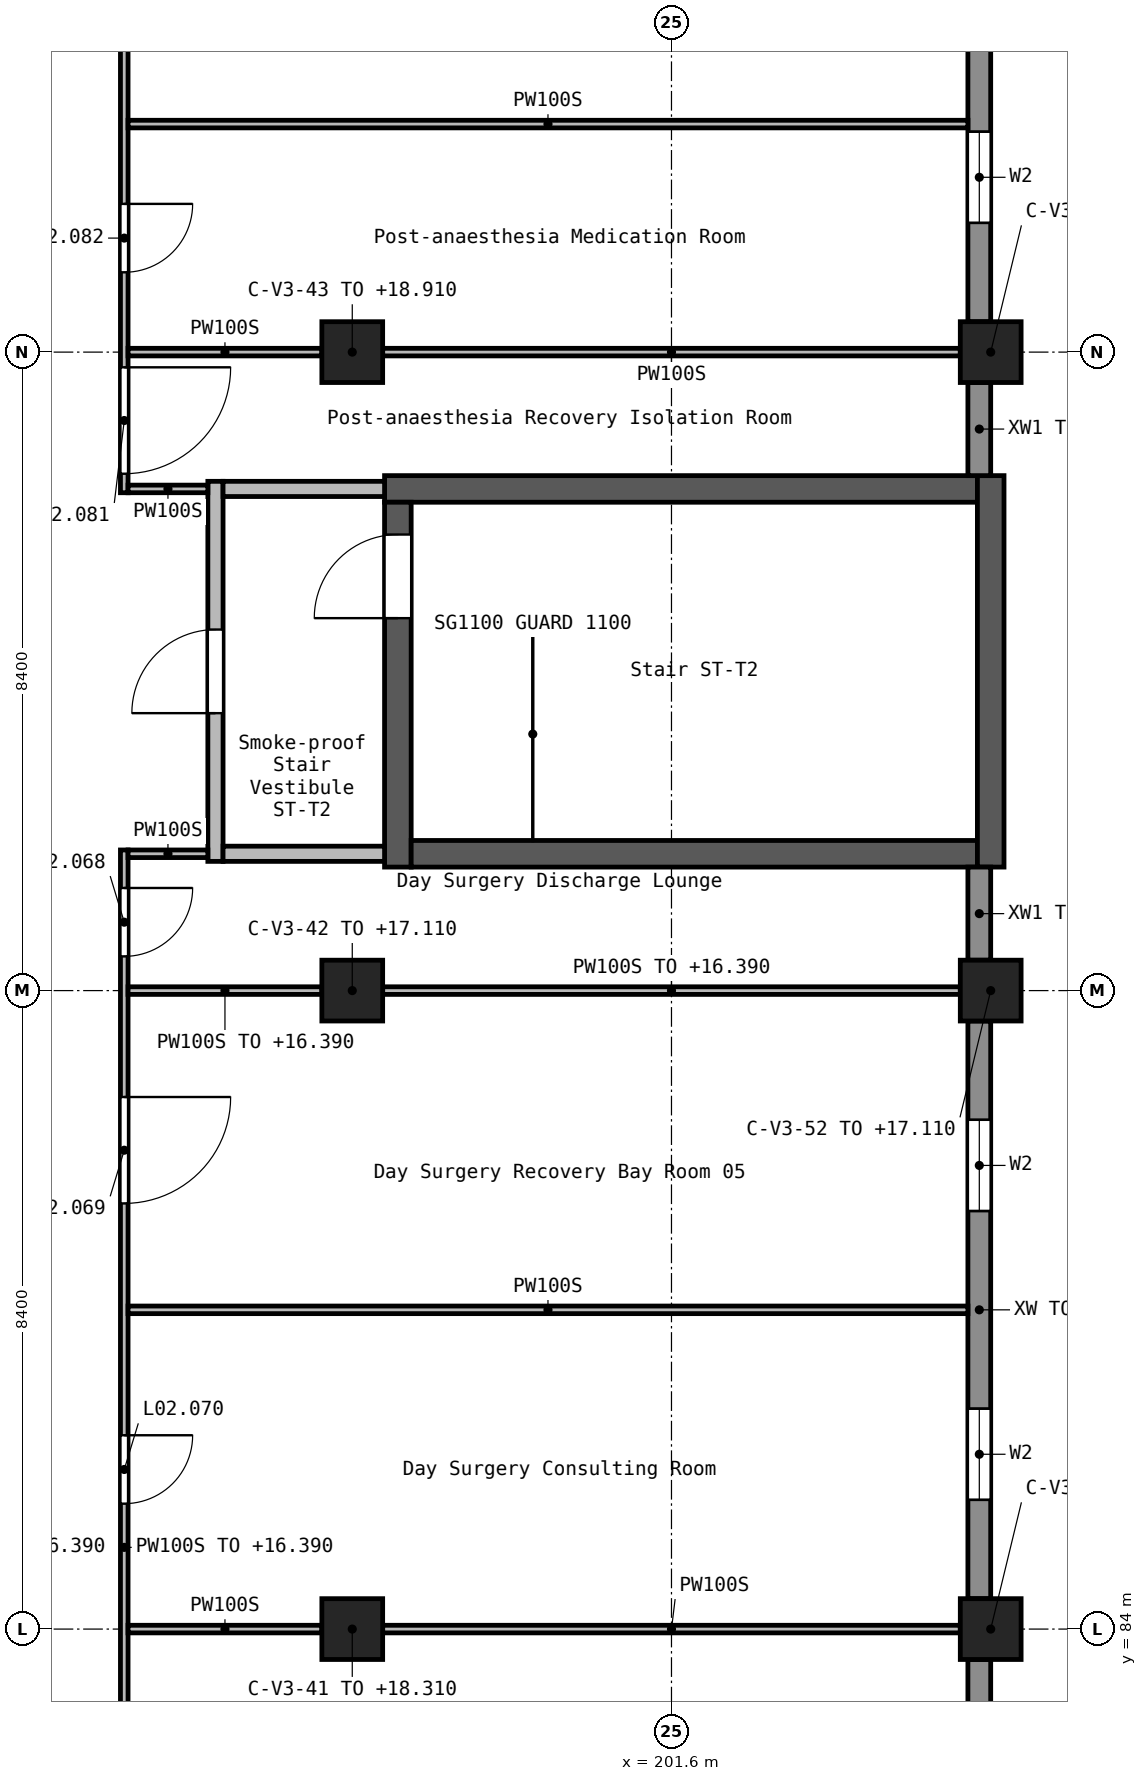
"""IFC4 building model, lengths in metres.
Left out: names, types, materials, properties, quantities, classifications, styles, units other than length and angle.
Written with IfcOpenShell. Run it as: python <this file> out.ifc"""

import sys

from ifc_helpers import new_model, si_unit, direction, frame, frame_2d, origin, origin_2d, place, context, subcontext, project, spatial, rectangle, extrude, element, fill, save


model = new_model("IFC4")
c1 = context("Model", 3, precision=1e-05, world=origin(), true_north=direction((0.0, 1.0)))
c2 = subcontext(c1, "Body", "Model", "MODEL_VIEW")
j1 = project(units=[si_unit("LENGTHUNIT", "METRE"), si_unit("PLANEANGLEUNIT", "RADIAN")], contexts=[c1])
p1 = place(None, origin())
s1 = spatial("IfcSite", under=j1, at=p1, CompositionType="ELEMENT")
p2 = place(p1, origin())
s2 = spatial("IfcBuilding", under=s1, at=p2, CompositionType="ELEMENT")
p3 = place(p2, frame((0.0, 0.0, 12.6)))
s3 = spatial("IfcBuildingStorey", under=s2, at=p3, CompositionType="ELEMENT", Elevation=12.6)
p4 = place(p3, frame((197.4, 84.0, 0.0), z_axis=(0.0, 0.0, 1.0), x_axis=(1.0, 0.0, 0.0)))
e1 = element("IfcColumn", 1, at=p4, inside=s3, PredefinedType="COLUMN", context=c2, shape_type="SweptSolid", body=[
    extrude(rectangle(XDim=0.8, YDim=0.8, at=origin_2d()), origin(), (0.0, 0.0, 1.0), 5.71),
])
p5 = place(p3, frame((197.4, 92.4, 0.0), z_axis=(0.0, 0.0, 1.0), x_axis=(1.0, 0.0, 0.0)))
e2 = element("IfcColumn", 2, at=p5, inside=s3, PredefinedType="COLUMN", context=c2, shape_type="SweptSolid", body=[
    extrude(rectangle(XDim=0.8, YDim=0.8, at=origin_2d()), origin(), (0.0, 0.0, 1.0), 4.51),
])
p6 = place(p3, frame((197.4, 100.8, 0.0), z_axis=(0.0, 0.0, 1.0), x_axis=(1.0, 0.0, 0.0)))
e3 = element("IfcColumn", 3, at=p6, inside=s3, PredefinedType="COLUMN", context=c2, shape_type="SweptSolid", body=[
    extrude(rectangle(XDim=0.8, YDim=0.8, at=origin_2d()), origin(), (0.0, 0.0, 1.0), 6.31),
])
p7 = place(p3, frame((205.8, 84.0, 0.0), z_axis=(0.0, 0.0, 1.0), x_axis=(1.0, 0.0, 0.0)))
e4 = element("IfcColumn", 4, at=p7, inside=s3, PredefinedType="COLUMN", context=c2, shape_type="SweptSolid", body=[
    extrude(rectangle(XDim=0.8, YDim=0.8, at=origin_2d()), origin(), (0.0, 0.0, 1.0), 5.71),
])
p8 = place(p3, frame((205.8, 92.4, 0.0), z_axis=(0.0, 0.0, 1.0), x_axis=(1.0, 0.0, 0.0)))
e5 = element("IfcColumn", 5, at=p8, inside=s3, PredefinedType="COLUMN", context=c2, shape_type="SweptSolid", body=[
    extrude(rectangle(XDim=0.8, YDim=0.8, at=origin_2d()), origin(), (0.0, 0.0, 1.0), 4.51),
])
p9 = place(p3, frame((205.8, 100.8, 0.0), z_axis=(0.0, 0.0, 1.0), x_axis=(1.0, 0.0, 0.0)))
e6 = element("IfcColumn", 6, at=p9, inside=s3, PredefinedType="COLUMN", context=c2, shape_type="SweptSolid", body=[
    extrude(rectangle(XDim=0.8, YDim=0.8, at=origin_2d()), origin(), (0.0, 0.0, 1.0), 6.31),
])
p10 = place(p3, frame((197.825, 99.0, 0.0), z_axis=(0.0, 0.0, 1.0), x_axis=(1.0, 0.0, 0.0)))
e7 = element("IfcWall", 7, at=p10, inside=s3, PredefinedType="SHEAR", context=c2, shape_type="SweptSolid", body=[
    extrude(rectangle(XDim=7.8, YDim=0.35, at=frame_2d((3.9, 0.0))), origin(), (0.0, 0.0, 1.0), 4.2),
])
p11 = place(p3, frame((198.0, 94.025, 0.0), z_axis=(0.0, 0.0, 1.0), x_axis=(0.0, 1.0, 0.0)))
e8 = element("IfcWall", 8, at=p11, inside=s3, PredefinedType="SHEAR", context=c2, shape_type="SweptSolid", body=[
    extrude(rectangle(XDim=4.8, YDim=0.35, at=frame_2d((2.4, 0.0))), origin(), (0.0, 0.0, 1.0), 4.2),
])
p12 = place(p11, frame((3.275, 0.0, 0.0)))
e9 = element("IfcOpeningElement", 9, at=p12, cuts=e8, PredefinedType="OPENING", context=c2, shape_type="SweptSolid", body=[
    extrude(rectangle(XDim=1.1, YDim=2.1, at=frame_2d((0.55, 1.05))), frame((0.0, 0.185, 0.0), z_axis=(0.0, -1.0, 0.0), x_axis=(1.0, 0.0, 0.0)), (0.0, 0.0, 1.0), 0.37),
])
p13 = place(p3, frame((198.175, 94.2, 0.0), z_axis=(0.0, 0.0, 1.0), x_axis=(1.0, 0.0, 0.0)))
e10 = element("IfcWall", 10, at=p13, inside=s3, PredefinedType="SHEAR", context=c2, shape_type="SweptSolid", body=[
    extrude(rectangle(XDim=7.45, YDim=0.35, at=frame_2d((3.725, 0.0))), origin(), (0.0, 0.0, 1.0), 4.2),
])
p14 = place(p3, frame((205.8, 94.025, 0.0), z_axis=(0.0, 0.0, 1.0), x_axis=(0.0, 1.0, 0.0)))
e11 = element("IfcWall", 11, at=p14, inside=s3, PredefinedType="SHEAR", context=c2, shape_type="SweptSolid", body=[
    extrude(rectangle(XDim=5.15, YDim=0.35, at=frame_2d((2.575, 0.0))), origin(), (0.0, 0.0, 1.0), 4.2),
])
p15 = place(p3, frame((205.65, 76.0, 0.0), z_axis=(0.0, 0.0, 1.0), x_axis=(0.0, 1.0, 0.0)))
e12 = element("IfcWall", 12, at=p15, inside=s3, PredefinedType="STANDARD", context=c2, shape_type="SweptSolid", body=[
    extrude(rectangle(XDim=7.6, YDim=0.3, at=frame_2d((3.8, 0.0))), origin(), (0.0, 0.0, 1.0), 3.05),
])
p16 = place(p15, frame((1.3, 0.0, 1.2)))
e13 = element("IfcOpeningElement", 13, at=p16, cuts=e12, PredefinedType="OPENING", context=c2, shape_type="SweptSolid", body=[
    extrude(rectangle(XDim=1.2, YDim=1.2, at=frame_2d((0.6, 0.6))), frame((0.0, 0.16, 0.0), z_axis=(0.0, -1.0, 0.0), x_axis=(1.0, 0.0, 0.0)), (0.0, 0.0, 1.0), 0.32),
])
p17 = place(p15, frame((5.1, 0.0, 1.2)))
e14 = element("IfcOpeningElement", 14, at=p17, cuts=e12, PredefinedType="OPENING", context=c2, shape_type="SweptSolid", body=[
    extrude(rectangle(XDim=1.2, YDim=1.2, at=frame_2d((0.6, 0.6))), frame((0.0, 0.16, 0.0), z_axis=(0.0, -1.0, 0.0), x_axis=(1.0, 0.0, 0.0)), (0.0, 0.0, 1.0), 0.32),
])
p18 = place(p3, frame((205.65, 84.4, 0.0), z_axis=(0.0, 0.0, 1.0), x_axis=(0.0, 1.0, 0.0)))
e15 = element("IfcWall", 15, at=p18, inside=s3, PredefinedType="STANDARD", context=c2, shape_type="SweptSolid", body=[
    extrude(rectangle(XDim=7.6, YDim=0.3, at=frame_2d((3.8, 0.0))), origin(), (0.0, 0.0, 1.0), 3.05),
])
p19 = place(p18, frame((1.3, 0.0, 1.2)))
e16 = element("IfcOpeningElement", 16, at=p19, cuts=e15, PredefinedType="OPENING", context=c2, shape_type="SweptSolid", body=[
    extrude(rectangle(XDim=1.2, YDim=1.2, at=frame_2d((0.6, 0.6))), frame((0.0, 0.16, 0.0), z_axis=(0.0, -1.0, 0.0), x_axis=(1.0, 0.0, 0.0)), (0.0, 0.0, 1.0), 0.32),
])
p20 = place(p18, frame((5.1, 0.0, 1.2)))
e17 = element("IfcOpeningElement", 17, at=p20, cuts=e15, PredefinedType="OPENING", context=c2, shape_type="SweptSolid", body=[
    extrude(rectangle(XDim=1.2, YDim=1.2, at=frame_2d((0.6, 0.6))), frame((0.0, 0.16, 0.0), z_axis=(0.0, -1.0, 0.0), x_axis=(1.0, 0.0, 0.0)), (0.0, 0.0, 1.0), 0.32),
])
for number, where, z_axis, x_axis in (
    (18, (205.65, 92.8, 0.0), (0.0, 0.0, 1.0), (0.0, 1.0, 0.0)),
    (19, (205.65, 99.175, 0.0), (0.0, 0.0, 1.0), (0.0, 1.0, 0.0)),
):
    element("IfcWall", number, at=place(p3, frame(where, z_axis=z_axis, x_axis=x_axis)), inside=s3, PredefinedType="STANDARD", context=c2, shape_type="SweptSolid", body=[
        extrude(rectangle(XDim=1.225, YDim=0.3, at=frame_2d((0.612, 0.0))), origin(), (0.0, 0.0, 1.0), 3.05),
    ])
p21 = place(p3, frame((205.65, 101.2, 0.0), z_axis=(0.0, 0.0, 1.0), x_axis=(0.0, 1.0, 0.0)))
e20 = element("IfcWall", 20, at=p21, inside=s3, PredefinedType="STANDARD", context=c2, shape_type="SweptSolid", body=[
    extrude(rectangle(XDim=7.6, YDim=0.3, at=frame_2d((3.8, 0.0))), origin(), (0.0, 0.0, 1.0), 3.05),
])
p22 = place(p21, frame((1.3, 0.0, 1.2)))
e21 = element("IfcOpeningElement", 21, at=p22, cuts=e20, PredefinedType="OPENING", context=c2, shape_type="SweptSolid", body=[
    extrude(rectangle(XDim=1.2, YDim=1.2, at=frame_2d((0.6, 0.6))), frame((0.0, 0.16, 0.0), z_axis=(0.0, -1.0, 0.0), x_axis=(1.0, 0.0, 0.0)), (0.0, 0.0, 1.0), 0.32),
])
p23 = place(p21, frame((5.1, 0.0, 1.2)))
e22 = element("IfcOpeningElement", 22, at=p23, cuts=e20, PredefinedType="OPENING", context=c2, shape_type="SweptSolid", body=[
    extrude(rectangle(XDim=1.2, YDim=1.2, at=frame_2d((0.6, 0.6))), frame((0.0, 0.16, 0.0), z_axis=(0.0, -1.0, 0.0), x_axis=(1.0, 0.0, 0.0)), (0.0, 0.0, 1.0), 0.32),
])
p24 = place(p3, frame((195.6, 94.1, 0.0), z_axis=(0.0, 0.0, 1.0), x_axis=(0.0, 1.0, 0.0)))
e23 = element("IfcWall", 23, at=p24, inside=s3, PredefinedType="SOLIDWALL", context=c2, shape_type="SweptSolid", body=[
    extrude(rectangle(XDim=5.0, YDim=0.2, at=frame_2d((2.5, 0.0))), origin(), (0.0, 0.0, 1.0), 3.85),
])
p25 = place(p24, frame((1.95, 0.0, 0.0)))
e24 = element("IfcOpeningElement", 24, at=p25, cuts=e23, PredefinedType="OPENING", context=c2, shape_type="SweptSolid", body=[
    extrude(rectangle(XDim=1.1, YDim=2.1, at=frame_2d((0.55, 1.05))), frame((0.0, 0.11, 0.0), z_axis=(0.0, -1.0, 0.0), x_axis=(1.0, 0.0, 0.0)), (0.0, 0.0, 1.0), 0.22),
])
for number, where, z_axis, x_axis in (
    (25, (195.7, 94.2, 0.0), (0.0, 0.0, 1.0), (1.0, 0.0, 0.0)),
    (26, (195.7, 99.0, 0.0), (0.0, 0.0, 1.0), (1.0, 0.0, 0.0)),
):
    element("IfcWall", number, at=place(p3, frame(where, z_axis=z_axis, x_axis=x_axis)), inside=s3, PredefinedType="SOLIDWALL", context=c2, shape_type="SweptSolid", body=[
        extrude(rectangle(XDim=2.125, YDim=0.2, at=frame_2d((1.062, 0.0))), origin(), (0.0, 0.0, 1.0), 3.85),
    ])
p26 = place(p3, frame((194.4, 94.25, 0.0), z_axis=(0.0, 0.0, 1.0), x_axis=(0.0, -1.0, 0.0)))
e27 = element("IfcWall", 27, at=p26, inside=s3, PredefinedType="PARTITIONING", context=c2, shape_type="SweptSolid", body=[
    extrude(rectangle(XDim=18.35, YDim=0.1, at=frame_2d((9.175, 0.0))), origin(), (0.0, 0.0, 1.0), 3.79),
])
p27 = place(p26, frame((0.5, 0.0, 0.0)))
e28 = element("IfcOpeningElement", 28, at=p27, cuts=e27, PredefinedType="OPENING", context=c2, shape_type="SweptSolid", body=[
    extrude(rectangle(XDim=0.9, YDim=2.1, at=frame_2d((0.45, 1.05))), frame((0.0, 0.06, 0.0), z_axis=(0.0, -1.0, 0.0), x_axis=(1.0, 0.0, 0.0)), (0.0, 0.0, 1.0), 0.12),
])
p28 = place(p26, frame((3.25, 0.0, 0.0)))
e29 = element("IfcOpeningElement", 29, at=p28, cuts=e27, PredefinedType="OPENING", context=c2, shape_type="SweptSolid", body=[
    extrude(rectangle(XDim=1.4, YDim=2.1, at=frame_2d((0.7, 1.05))), frame((0.0, 0.06, 0.0), z_axis=(0.0, -1.0, 0.0), x_axis=(1.0, 0.0, 0.0)), (0.0, 0.0, 1.0), 0.12),
])
p29 = place(p26, frame((7.7, 0.0, 0.0)))
e30 = element("IfcOpeningElement", 30, at=p29, cuts=e27, PredefinedType="OPENING", context=c2, shape_type="SweptSolid", body=[
    extrude(rectangle(XDim=0.9, YDim=2.1, at=frame_2d((0.45, 1.05))), frame((0.0, 0.06, 0.0), z_axis=(0.0, -1.0, 0.0), x_axis=(1.0, 0.0, 0.0)), (0.0, 0.0, 1.0), 0.12),
])
p30 = place(p26, frame((11.55, 0.0, 0.0)))
e31 = element("IfcOpeningElement", 31, at=p30, cuts=e27, PredefinedType="OPENING", context=c2, shape_type="SweptSolid", body=[
    extrude(rectangle(XDim=1.0, YDim=2.1, at=frame_2d((0.5, 1.05))), frame((0.0, 0.06, 0.0), z_axis=(0.0, -1.0, 0.0), x_axis=(1.0, 0.0, 0.0)), (0.0, 0.0, 1.0), 0.12),
])
p31 = place(p26, frame((15.55, 0.0, 0.0)))
e32 = element("IfcOpeningElement", 32, at=p31, cuts=e27, PredefinedType="OPENING", context=c2, shape_type="SweptSolid", body=[
    extrude(rectangle(XDim=1.4, YDim=2.1, at=frame_2d((0.7, 1.05))), frame((0.0, 0.06, 0.0), z_axis=(0.0, -1.0, 0.0), x_axis=(1.0, 0.0, 0.0)), (0.0, 0.0, 1.0), 0.12),
])
p32 = place(p3, frame((194.4, 117.3, 0.0), z_axis=(0.0, 0.0, 1.0), x_axis=(0.0, -1.0, 0.0)))
e33 = element("IfcWall", 33, at=p32, inside=s3, PredefinedType="PARTITIONING", context=c2, shape_type="SweptSolid", body=[
    extrude(rectangle(XDim=18.35, YDim=0.1, at=frame_2d((9.175, 0.0))), origin(), (0.0, 0.0, 1.0), 3.85),
])
p33 = place(p32, frame((16.7, 0.0, 0.0)))
e34 = element("IfcOpeningElement", 34, at=p33, cuts=e33, PredefinedType="OPENING", context=c2, shape_type="SweptSolid", body=[
    extrude(rectangle(XDim=1.4, YDim=2.1, at=frame_2d((0.7, 1.05))), frame((0.0, 0.06, 0.0), z_axis=(0.0, -1.0, 0.0), x_axis=(1.0, 0.0, 0.0)), (0.0, 0.0, 1.0), 0.12),
])
p34 = place(p32, frame((14.55, 0.0, 0.0)))
e35 = element("IfcOpeningElement", 35, at=p34, cuts=e33, PredefinedType="OPENING", context=c2, shape_type="SweptSolid", body=[
    extrude(rectangle(XDim=0.9, YDim=2.1, at=frame_2d((0.45, 1.05))), frame((0.0, 0.06, 0.0), z_axis=(0.0, -1.0, 0.0), x_axis=(1.0, 0.0, 0.0)), (0.0, 0.0, 1.0), 0.12),
])
p35 = place(p32, frame((10.1, 0.0, 0.0)))
e36 = element("IfcOpeningElement", 36, at=p35, cuts=e33, PredefinedType="OPENING", context=c2, shape_type="SweptSolid", body=[
    extrude(rectangle(XDim=1.4, YDim=2.1, at=frame_2d((0.7, 1.05))), frame((0.0, 0.06, 0.0), z_axis=(0.0, -1.0, 0.0), x_axis=(1.0, 0.0, 0.0)), (0.0, 0.0, 1.0), 0.12),
])
p36 = place(p32, frame((3.45, 0.0, 0.0)))
e37 = element("IfcOpeningElement", 37, at=p36, cuts=e33, PredefinedType="OPENING", context=c2, shape_type="SweptSolid", body=[
    extrude(rectangle(XDim=0.9, YDim=2.1, at=frame_2d((0.45, 1.05))), frame((0.0, 0.06, 0.0), z_axis=(0.0, -1.0, 0.0), x_axis=(1.0, 0.0, 0.0)), (0.0, 0.0, 1.0), 0.12),
])
p37 = place(p3, frame((194.45, 84.0, 0.0), z_axis=(0.0, 0.0, 1.0), x_axis=(1.0, 0.0, 0.0)))
e38 = element("IfcWall", 38, at=p37, inside=s3, PredefinedType="PARTITIONING", context=c2, shape_type="SweptSolid", body=[
    extrude(rectangle(XDim=2.55, YDim=0.1, at=frame_2d((1.275, 0.0))), origin(), (0.0, 0.0, 1.0), 3.85),
])
p38 = place(p3, frame((197.8, 84.0, 0.0), z_axis=(0.0, 0.0, 1.0), x_axis=(1.0, 0.0, 0.0)))
e39 = element("IfcWall", 39, at=p38, inside=s3, PredefinedType="PARTITIONING", context=c2, shape_type="SweptSolid", body=[
    extrude(rectangle(XDim=7.6, YDim=0.1, at=frame_2d((3.8, 0.0))), origin(), (0.0, 0.0, 1.0), 3.85),
])
p39 = place(p3, frame((194.45, 88.2, 0.0), z_axis=(0.0, 0.0, 1.0), x_axis=(1.0, 0.0, 0.0)))
e40 = element("IfcWall", 40, at=p39, inside=s3, PredefinedType="PARTITIONING", context=c2, shape_type="SweptSolid", body=[
    extrude(rectangle(XDim=11.05, YDim=0.1, at=frame_2d((5.525, 0.0))), origin(), (0.0, 0.0, 1.0), 3.85),
])
p40 = place(p3, frame((194.45, 92.4, 0.0), z_axis=(0.0, 0.0, 1.0), x_axis=(1.0, 0.0, 0.0)))
e41 = element("IfcWall", 41, at=p40, inside=s3, PredefinedType="PARTITIONING", context=c2, shape_type="SweptSolid", body=[
    extrude(rectangle(XDim=2.55, YDim=0.1, at=frame_2d((1.275, 0.0))), origin(), (0.0, 0.0, 1.0), 3.79),
])
p41 = place(p3, frame((197.8, 92.4, 0.0), z_axis=(0.0, 0.0, 1.0), x_axis=(1.0, 0.0, 0.0)))
e42 = element("IfcWall", 42, at=p41, inside=s3, PredefinedType="PARTITIONING", context=c2, shape_type="SweptSolid", body=[
    extrude(rectangle(XDim=7.6, YDim=0.1, at=frame_2d((3.8, 0.0))), origin(), (0.0, 0.0, 1.0), 3.79),
])
p42 = place(p3, frame((194.45, 100.8, 0.0), z_axis=(0.0, 0.0, 1.0), x_axis=(1.0, 0.0, 0.0)))
e43 = element("IfcWall", 43, at=p42, inside=s3, PredefinedType="PARTITIONING", context=c2, shape_type="SweptSolid", body=[
    extrude(rectangle(XDim=2.55, YDim=0.1, at=frame_2d((1.275, 0.0))), origin(), (0.0, 0.0, 1.0), 3.85),
])
p43 = place(p3, frame((197.8, 100.8, 0.0), z_axis=(0.0, 0.0, 1.0), x_axis=(1.0, 0.0, 0.0)))
e44 = element("IfcWall", 44, at=p43, inside=s3, PredefinedType="PARTITIONING", context=c2, shape_type="SweptSolid", body=[
    extrude(rectangle(XDim=7.6, YDim=0.1, at=frame_2d((3.8, 0.0))), origin(), (0.0, 0.0, 1.0), 3.85),
])
p44 = place(p3, frame((194.45, 103.8, 0.0), z_axis=(0.0, 0.0, 1.0), x_axis=(1.0, 0.0, 0.0)))
e45 = element("IfcWall", 45, at=p44, inside=s3, PredefinedType="PARTITIONING", context=c2, shape_type="SweptSolid", body=[
    extrude(rectangle(XDim=11.05, YDim=0.1, at=frame_2d((5.525, 0.0))), origin(), (0.0, 0.0, 1.0), 3.85),
])
for number, where, z_axis, x_axis in (
    (46, (194.45, 94.2, 0.0), (0.0, 0.0, 1.0), (1.0, 0.0, 0.0)),
    (47, (194.45, 99.0, 0.0), (0.0, 0.0, 1.0), (1.0, 0.0, 0.0)),
):
    element("IfcWall", number, at=place(p3, frame(where, z_axis=z_axis, x_axis=x_axis)), inside=s3, PredefinedType="PARTITIONING", context=c2, shape_type="SweptSolid", body=[
        extrude(rectangle(XDim=1.05, YDim=0.1, at=frame_2d((0.525, 0.0))), origin(), (0.0, 0.0, 1.0), 3.85),
    ])
p45 = place(p19, origin())
e48 = element("IfcWindow", 48, at=p45, inside=s3, PartitioningType="SINGLE_PANEL", PredefinedType="WINDOW", context=c2, shape_type="SweptSolid", body=[
    extrude(rectangle(XDim=1.2, YDim=1.2, at=frame_2d((0.6, 0.6))), frame((0.0, 0.03, 0.0), z_axis=(0.0, -1.0, 0.0), x_axis=(1.0, 0.0, 0.0)), (0.0, 0.0, 1.0), 0.06),
])
fill(e16, e48)
p46 = place(p20, origin())
e49 = element("IfcWindow", 49, at=p46, inside=s3, PartitioningType="SINGLE_PANEL", PredefinedType="WINDOW", context=c2, shape_type="SweptSolid", body=[
    extrude(rectangle(XDim=1.2, YDim=1.2, at=frame_2d((0.6, 0.6))), frame((0.0, 0.03, 0.0), z_axis=(0.0, -1.0, 0.0), x_axis=(1.0, 0.0, 0.0)), (0.0, 0.0, 1.0), 0.06),
])
fill(e17, e49)
p47 = place(p22, origin())
e50 = element("IfcWindow", 50, at=p47, inside=s3, PartitioningType="SINGLE_PANEL", PredefinedType="WINDOW", context=c2, shape_type="SweptSolid", body=[
    extrude(rectangle(XDim=1.2, YDim=1.2, at=frame_2d((0.6, 0.6))), frame((0.0, 0.03, 0.0), z_axis=(0.0, -1.0, 0.0), x_axis=(1.0, 0.0, 0.0)), (0.0, 0.0, 1.0), 0.06),
])
fill(e21, e50)
p48 = place(p12, frame((1.1, 0.0, 0.0), z_axis=(0.0, 0.0, 1.0), x_axis=(-1.0, 0.0, 0.0)))
e51 = element("IfcDoor", 51, at=p48, inside=s3, OperationType="SINGLE_SWING_LEFT", PredefinedType="DOOR", context=c2, shape_type="SweptSolid", body=[
    extrude(rectangle(XDim=1.1, YDim=2.1, at=frame_2d((0.55, 1.05))), frame((0.0, 0.025, 0.0), z_axis=(0.0, -1.0, 0.0), x_axis=(1.0, 0.0, 0.0)), (0.0, 0.0, 1.0), 0.05),
])
fill(e9, e51)
p49 = place(p25, frame((1.1, 0.0, 0.0), z_axis=(0.0, 0.0, 1.0), x_axis=(-1.0, 0.0, 0.0)))
e52 = element("IfcDoor", 52, at=p49, inside=s3, OperationType="SINGLE_SWING_RIGHT", PredefinedType="DOOR", context=c2, shape_type="SweptSolid", body=[
    extrude(rectangle(XDim=1.1, YDim=2.1, at=frame_2d((0.55, 1.05))), frame((0.0, 0.025, 0.0), z_axis=(0.0, -1.0, 0.0), x_axis=(1.0, 0.0, 0.0)), (0.0, 0.0, 1.0), 0.05),
])
fill(e24, e52)
p50 = place(p27, origin())
e53 = element("IfcDoor", 53, at=p50, inside=s3, OperationType="SINGLE_SWING_LEFT", PredefinedType="DOOR", context=c2, shape_type="SweptSolid", body=[
    extrude(rectangle(XDim=0.9, YDim=2.1, at=frame_2d((0.45, 1.05))), frame((0.0, 0.025, 0.0), z_axis=(0.0, -1.0, 0.0), x_axis=(1.0, 0.0, 0.0)), (0.0, 0.0, 1.0), 0.05),
])
fill(e28, e53)
p51 = place(p28, origin())
e54 = element("IfcDoor", 54, at=p51, inside=s3, OperationType="DOUBLE_DOOR_SINGLE_SWING", PredefinedType="DOOR", context=c2, shape_type="SweptSolid", body=[
    extrude(rectangle(XDim=1.4, YDim=2.1, at=frame_2d((0.7, 1.05))), frame((0.0, 0.025, 0.0), z_axis=(0.0, -1.0, 0.0), x_axis=(1.0, 0.0, 0.0)), (0.0, 0.0, 1.0), 0.05),
])
fill(e29, e54)
p52 = place(p29, origin())
e55 = element("IfcDoor", 55, at=p52, inside=s3, OperationType="SINGLE_SWING_LEFT", PredefinedType="DOOR", context=c2, shape_type="SweptSolid", body=[
    extrude(rectangle(XDim=0.9, YDim=2.1, at=frame_2d((0.45, 1.05))), frame((0.0, 0.025, 0.0), z_axis=(0.0, -1.0, 0.0), x_axis=(1.0, 0.0, 0.0)), (0.0, 0.0, 1.0), 0.05),
])
fill(e30, e55)
p53 = place(p33, origin())
e56 = element("IfcDoor", 56, at=p53, inside=s3, OperationType="DOUBLE_DOOR_SINGLE_SWING", PredefinedType="DOOR", context=c2, shape_type="SweptSolid", body=[
    extrude(rectangle(XDim=1.4, YDim=2.1, at=frame_2d((0.7, 1.05))), frame((0.0, 0.025, 0.0), z_axis=(0.0, -1.0, 0.0), x_axis=(1.0, 0.0, 0.0)), (0.0, 0.0, 1.0), 0.05),
])
fill(e34, e56)
p54 = place(p34, origin())
e57 = element("IfcDoor", 57, at=p54, inside=s3, OperationType="SINGLE_SWING_RIGHT", PredefinedType="DOOR", context=c2, shape_type="SweptSolid", body=[
    extrude(rectangle(XDim=0.9, YDim=2.1, at=frame_2d((0.45, 1.05))), frame((0.0, 0.025, 0.0), z_axis=(0.0, -1.0, 0.0), x_axis=(1.0, 0.0, 0.0)), (0.0, 0.0, 1.0), 0.05),
])
fill(e35, e57)
save(model, sys.argv[1])
